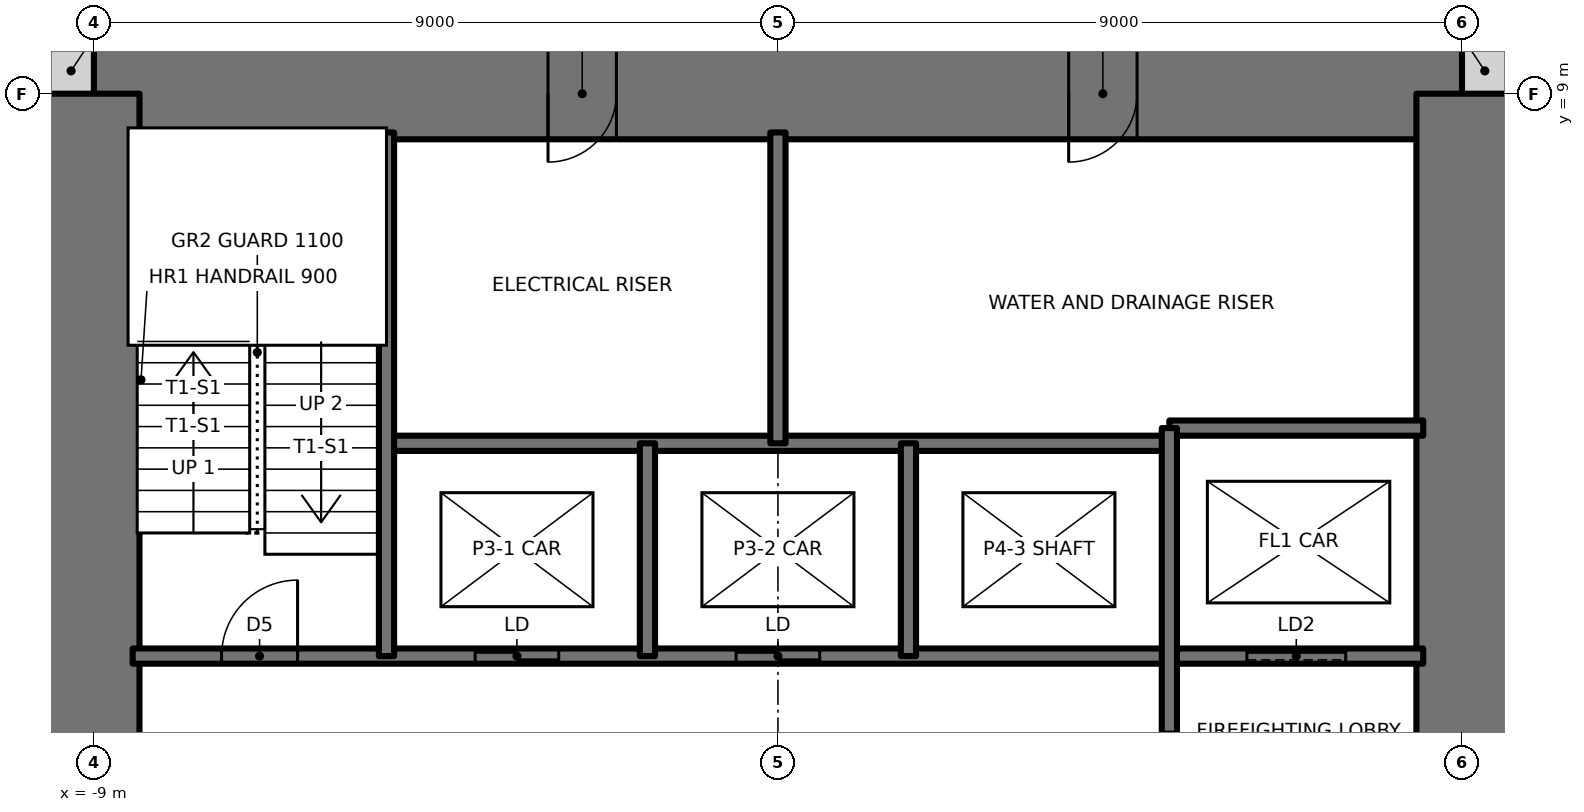
"""IFC4 building model, lengths in metres.
Left out: names, types, materials, properties, quantities, classifications, styles, units other than length and angle.
Written with IfcOpenShell. Run it as: python <this file> out.ifc"""

import sys

from ifc_helpers import new_model, si_unit, direction, frame, frame_2d, origin, place, context, subcontext, project, spatial, rectangle, extrude, element, fill, save


model = new_model("IFC4")
c1 = context("Model", 3, precision=1e-05, world=origin(), true_north=direction((0.0, 1.0)))
c2 = subcontext(c1, "Body", "Model", "MODEL_VIEW")
j1 = project(units=[si_unit("LENGTHUNIT", "METRE"), si_unit("PLANEANGLEUNIT", "RADIAN")], contexts=[c1])
p1 = place(None, origin())
s1 = spatial("IfcSite", under=j1, at=p1, CompositionType="ELEMENT")
p2 = place(p1, origin())
s2 = spatial("IfcBuilding", under=s1, at=p2, CompositionType="ELEMENT")
p3 = place(p2, frame((0.0, 0.0, 160.0)))
s3 = spatial("IfcBuildingStorey", under=s2, at=p3, CompositionType="ELEMENT", Elevation=160.0)
for number, where, z_axis, x_axis in (
    (1, (9.0, 9.3, 0.0), (0.0, 0.0, 1.0), (1.0, 0.0, 0.0)),
    (2, (-9.6, 9.3, 0.0), (0.0, 0.0, 1.0), (1.0, 0.0, 0.0)),
):
    element("IfcWall", number, at=place(p3, frame(where, z_axis=z_axis, x_axis=x_axis)), inside=s3, PredefinedType="SOLIDWALL", context=c2, shape_type="SweptSolid", body=[
        extrude(rectangle(XDim=0.6, YDim=0.6, at=frame_2d((0.3, 0.0))), origin(), (0.0, 0.0, 1.0), 3.5),
    ])
p4 = place(p3, frame((9.0, 9.0, 0.0), z_axis=(0.0, 0.0, 1.0), x_axis=(-1.0, 0.0, 0.0)))
e3 = element("IfcWall", 3, at=p4, inside=s3, PredefinedType="SHEAR", context=c2, shape_type="SweptSolid", body=[
    extrude(rectangle(XDim=18.0, YDim=1.2, at=frame_2d((9.0, 0.0))), origin(), (0.0, 0.0, 1.0), 3.5),
])
p5 = place(p4, frame((11.125, 0.0, 0.0)))
e4 = element("IfcOpeningElement", 4, at=p5, cuts=e3, PredefinedType="OPENING", context=c2, shape_type="SweptSolid", body=[
    extrude(rectangle(XDim=0.9, YDim=2.1, at=frame_2d((0.45, 1.05))), frame((0.0, 0.61, 0.0), z_axis=(0.0, -1.0, 0.0), x_axis=(1.0, 0.0, 0.0)), (0.0, 0.0, 1.0), 1.22),
])
p6 = place(p4, frame((4.275, 0.0, 0.0)))
e5 = element("IfcOpeningElement", 5, at=p6, cuts=e3, PredefinedType="OPENING", context=c2, shape_type="SweptSolid", body=[
    extrude(rectangle(XDim=0.9, YDim=2.1, at=frame_2d((0.45, 1.05))), frame((0.0, 0.61, 0.0), z_axis=(0.0, -1.0, 0.0), x_axis=(1.0, 0.0, 0.0)), (0.0, 0.0, 1.0), 1.22),
])
p7 = place(p3, frame((9.0, -9.0, 0.0), z_axis=(0.0, 0.0, 1.0), x_axis=(0.0, 1.0, 0.0)))
e6 = element("IfcWall", 6, at=p7, inside=s3, PredefinedType="SHEAR", context=c2, shape_type="SweptSolid", body=[
    extrude(rectangle(XDim=18.0, YDim=1.2, at=frame_2d((9.0, 0.0))), origin(), (0.0, 0.0, 1.0), 3.5),
])
p8 = place(p7, frame((8.5, 0.0, 0.0)))
e7 = element("IfcOpeningElement", 7, at=p8, cuts=e6, PredefinedType="OPENING", context=c2, shape_type="SweptSolid", body=[
    extrude(rectangle(XDim=1.0, YDim=2.1, at=frame_2d((0.5, 1.05))), frame((0.0, 0.61, 0.0), z_axis=(0.0, -1.0, 0.0), x_axis=(1.0, 0.0, 0.0)), (0.0, 0.0, 1.0), 1.22),
])
p9 = place(p3, frame((-9.0, 9.0, 0.0), z_axis=(0.0, 0.0, 1.0), x_axis=(0.0, -1.0, 0.0)))
e8 = element("IfcWall", 8, at=p9, inside=s3, PredefinedType="SHEAR", context=c2, shape_type="SweptSolid", body=[
    extrude(rectangle(XDim=18.0, YDim=1.2, at=frame_2d((9.0, 0.0))), origin(), (0.0, 0.0, 1.0), 3.5),
])
p10 = place(p9, frame((8.5, 0.0, 0.0)))
e9 = element("IfcOpeningElement", 9, at=p10, cuts=e8, PredefinedType="OPENING", context=c2, shape_type="SweptSolid", body=[
    extrude(rectangle(XDim=1.0, YDim=2.1, at=frame_2d((0.5, 1.05))), frame((0.0, 0.61, 0.0), z_axis=(0.0, -1.0, 0.0), x_axis=(1.0, 0.0, 0.0)), (0.0, 0.0, 1.0), 1.22),
])
p11 = place(p3, frame((-8.49, 1.6, 0.0), z_axis=(0.0, 0.0, 1.0), x_axis=(1.0, 0.0, 0.0)))
e10 = element("IfcWall", 10, at=p11, inside=s3, PredefinedType="SOLIDWALL", context=c2, shape_type="SweptSolid", body=[
    extrude(rectangle(XDim=16.98, YDim=0.2, at=frame_2d((8.49, 0.0))), origin(), (0.0, 0.0, 1.0), 3.5),
])
p12 = place(p11, frame((1.17, 0.0, 0.0)))
e11 = element("IfcOpeningElement", 11, at=p12, cuts=e10, PredefinedType="OPENING", context=c2, shape_type="SweptSolid", body=[
    extrude(rectangle(XDim=1.0, YDim=2.1, at=frame_2d((0.5, 1.05))), frame((0.0, 0.11, 0.0), z_axis=(0.0, -1.0, 0.0), x_axis=(1.0, 0.0, 0.0)), (0.0, 0.0, 1.0), 0.22),
])
p13 = place(p11, frame((4.506, 0.0, 0.0)))
e12 = element("IfcOpeningElement", 12, at=p13, cuts=e10, PredefinedType="OPENING", context=c2, shape_type="SweptSolid", body=[
    extrude(rectangle(XDim=1.1, YDim=2.1, at=frame_2d((0.55, 1.05))), frame((0.0, 0.11, 0.0), z_axis=(0.0, -1.0, 0.0), x_axis=(1.0, 0.0, 0.0)), (0.0, 0.0, 1.0), 0.22),
])
p14 = place(p11, frame((7.94, 0.0, 0.0)))
e13 = element("IfcOpeningElement", 13, at=p14, cuts=e10, PredefinedType="OPENING", context=c2, shape_type="SweptSolid", body=[
    extrude(rectangle(XDim=1.1, YDim=2.1, at=frame_2d((0.55, 1.05))), frame((0.0, 0.11, 0.0), z_axis=(0.0, -1.0, 0.0), x_axis=(1.0, 0.0, 0.0)), (0.0, 0.0, 1.0), 0.22),
])
p15 = place(p11, frame((14.66, 0.0, 0.0)))
e14 = element("IfcOpeningElement", 14, at=p15, cuts=e10, PredefinedType="OPENING", context=c2, shape_type="SweptSolid", body=[
    extrude(rectangle(XDim=1.3, YDim=2.1, at=frame_2d((0.65, 1.05))), frame((0.0, 0.11, 0.0), z_axis=(0.0, -1.0, 0.0), x_axis=(1.0, 0.0, 0.0)), (0.0, 0.0, 1.0), 0.22),
])
p16 = place(p3, frame((-5.15, 4.4, 0.0), z_axis=(0.0, 0.0, 1.0), x_axis=(1.0, 0.0, 0.0)))
e15 = element("IfcWall", 15, at=p16, inside=s3, PredefinedType="SOLIDWALL", context=c2, shape_type="SweptSolid", body=[
    extrude(rectangle(XDim=10.3, YDim=0.2, at=frame_2d((5.15, 0.0))), origin(), (0.0, 0.0, 1.0), 3.5),
])
p17 = place(p3, frame((5.15, 4.6, 0.0), z_axis=(0.0, 0.0, 1.0), x_axis=(1.0, 0.0, 0.0)))
e16 = element("IfcWall", 16, at=p17, inside=s3, PredefinedType="SOLIDWALL", context=c2, shape_type="SweptSolid", body=[
    extrude(rectangle(XDim=3.34, YDim=0.2, at=frame_2d((1.67, 0.0))), origin(), (0.0, 0.0, 1.0), 3.5),
])
p18 = place(p3, frame((5.15, -8.49, 0.0), z_axis=(0.0, 0.0, 1.0), x_axis=(0.0, 1.0, 0.0)))
e17 = element("IfcWall", 17, at=p18, inside=s3, PredefinedType="SOLIDWALL", context=c2, shape_type="SweptSolid", body=[
    extrude(rectangle(XDim=13.09, YDim=0.2, at=frame_2d((6.545, 0.0))), origin(), (0.0, 0.0, 1.0), 3.5),
])
p19 = place(p18, frame((7.89, 0.0, 0.0)))
e18 = element("IfcOpeningElement", 18, at=p19, cuts=e17, PredefinedType="OPENING", context=c2, shape_type="SweptSolid", body=[
    extrude(rectangle(XDim=1.2, YDim=2.1, at=frame_2d((0.6, 1.05))), frame((0.0, 0.11, 0.0), z_axis=(0.0, -1.0, 0.0), x_axis=(1.0, 0.0, 0.0)), (0.0, 0.0, 1.0), 0.22),
])
p20 = place(p3, frame((1.717, 1.6, 0.0), z_axis=(0.0, 0.0, 1.0), x_axis=(0.0, 1.0, 0.0)))
e19 = element("IfcWall", 19, at=p20, inside=s3, PredefinedType="SOLIDWALL", context=c2, shape_type="SweptSolid", body=[
    extrude(rectangle(XDim=2.8, YDim=0.2, at=frame_2d((1.4, 0.0))), origin(), (0.0, 0.0, 1.0), 3.5),
])
p21 = place(p3, frame((0.0, 4.4, 0.0), z_axis=(0.0, 0.0, 1.0), x_axis=(0.0, 1.0, 0.0)))
e20 = element("IfcWall", 20, at=p21, inside=s3, PredefinedType="SOLIDWALL", context=c2, shape_type="SweptSolid", body=[
    extrude(rectangle(XDim=4.09, YDim=0.2, at=frame_2d((2.045, 0.0))), origin(), (0.0, 0.0, 1.0), 3.5),
])
p22 = place(p3, frame((-1.717, 1.6, 0.0), z_axis=(0.0, 0.0, 1.0), x_axis=(0.0, 1.0, 0.0)))
e21 = element("IfcWall", 21, at=p22, inside=s3, PredefinedType="SOLIDWALL", context=c2, shape_type="SweptSolid", body=[
    extrude(rectangle(XDim=2.8, YDim=0.2, at=frame_2d((1.4, 0.0))), origin(), (0.0, 0.0, 1.0), 3.5),
])
p23 = place(p3, frame((-5.15, 1.6, 0.0), z_axis=(0.0, 0.0, 1.0), x_axis=(0.0, 1.0, 0.0)))
e22 = element("IfcWall", 22, at=p23, inside=s3, PredefinedType="SOLIDWALL", context=c2, shape_type="SweptSolid", body=[
    extrude(rectangle(XDim=6.89, YDim=0.2, at=frame_2d((3.445, 0.0))), origin(), (0.0, 0.0, 1.0), 3.5),
])
p24 = place(p12, origin())
e23 = element("IfcDoor", 23, at=p24, inside=s3, OperationType="SINGLE_SWING_RIGHT", PredefinedType="DOOR", context=c2, shape_type="SweptSolid", body=[
    extrude(rectangle(XDim=1.0, YDim=2.1, at=frame_2d((0.5, 1.05))), frame((0.0, 0.025, 0.0), z_axis=(0.0, -1.0, 0.0), x_axis=(1.0, 0.0, 0.0)), (0.0, 0.0, 1.0), 0.05),
])
fill(e11, e23)
p25 = place(p5, origin())
e24 = element("IfcDoor", 24, at=p25, inside=s3, OperationType="SINGLE_SWING_RIGHT", PredefinedType="DOOR", context=c2, shape_type="SweptSolid", body=[
    extrude(rectangle(XDim=0.9, YDim=2.1, at=frame_2d((0.45, 1.05))), frame((0.0, 0.025, 0.0), z_axis=(0.0, -1.0, 0.0), x_axis=(1.0, 0.0, 0.0)), (0.0, 0.0, 1.0), 0.05),
])
fill(e4, e24)
p26 = place(p6, origin())
e25 = element("IfcDoor", 25, at=p26, inside=s3, OperationType="SINGLE_SWING_RIGHT", PredefinedType="DOOR", context=c2, shape_type="SweptSolid", body=[
    extrude(rectangle(XDim=0.9, YDim=2.1, at=frame_2d((0.45, 1.05))), frame((0.0, 0.025, 0.0), z_axis=(0.0, -1.0, 0.0), x_axis=(1.0, 0.0, 0.0)), (0.0, 0.0, 1.0), 0.05),
])
fill(e5, e25)
p27 = place(p13, origin())
e26 = element("IfcDoor", 26, at=p27, inside=s3, OperationType="DOUBLE_DOOR_SLIDING", PredefinedType="DOOR", context=c2, shape_type="SweptSolid", body=[
    extrude(rectangle(XDim=1.1, YDim=2.1, at=frame_2d((0.55, 1.05))), frame((0.0, 0.025, 0.0), z_axis=(0.0, -1.0, 0.0), x_axis=(1.0, 0.0, 0.0)), (0.0, 0.0, 1.0), 0.05),
])
fill(e12, e26)
p28 = place(p14, origin())
e27 = element("IfcDoor", 27, at=p28, inside=s3, OperationType="DOUBLE_DOOR_SLIDING", PredefinedType="DOOR", context=c2, shape_type="SweptSolid", body=[
    extrude(rectangle(XDim=1.1, YDim=2.1, at=frame_2d((0.55, 1.05))), frame((0.0, 0.025, 0.0), z_axis=(0.0, -1.0, 0.0), x_axis=(1.0, 0.0, 0.0)), (0.0, 0.0, 1.0), 0.05),
])
fill(e13, e27)
p29 = place(p15, origin())
e28 = element("IfcDoor", 28, at=p29, inside=s3, OperationType="SLIDING_TO_LEFT", PredefinedType="DOOR", context=c2, shape_type="SweptSolid", body=[
    extrude(rectangle(XDim=1.3, YDim=2.1, at=frame_2d((0.65, 1.05))), frame((0.0, 0.025, 0.0), z_axis=(0.0, -1.0, 0.0), x_axis=(1.0, 0.0, 0.0)), (0.0, 0.0, 1.0), 0.05),
])
fill(e14, e28)
save(model, sys.argv[1])
